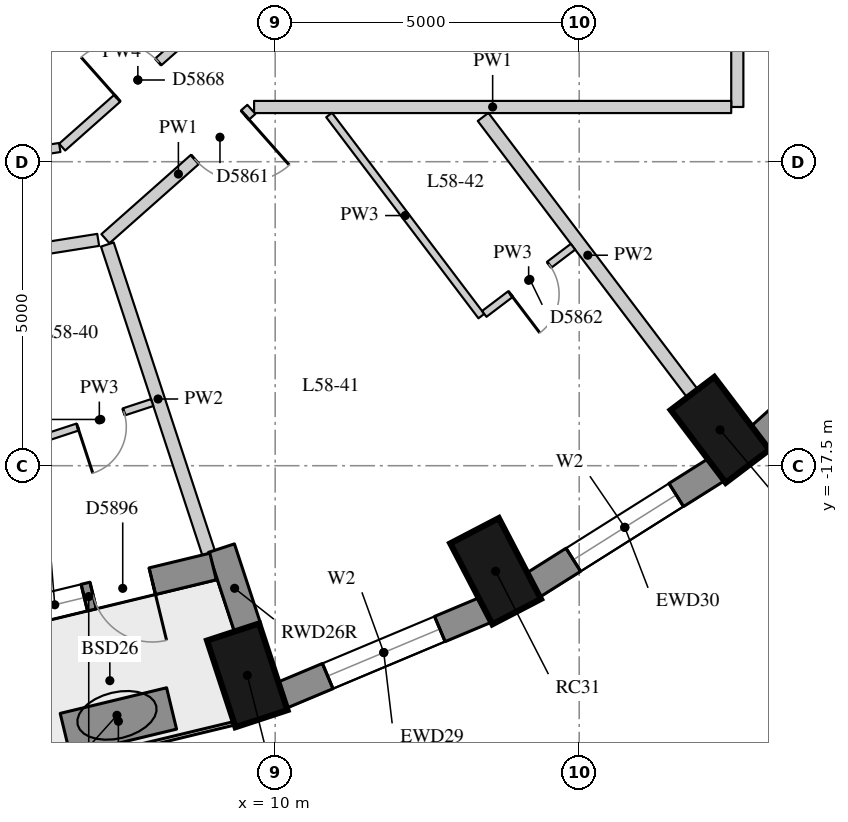
"""IFC4 building model, lengths in metres.
Left out: names, types, materials, properties, quantities, classifications, styles, units other than length and angle.
Written with IfcOpenShell. Run it as: python <this file> out.ifc"""

import sys

from ifc_helpers import new_model, si_unit, direction, frame, frame_2d, origin, origin_2d, place, context, subcontext, project, spatial, rectangle, extrude, element, fill, save


model = new_model("IFC4")
c1 = context("Model", 3, precision=1e-05, world=origin(), true_north=direction((0.0, 1.0)))
c2 = subcontext(c1, "Body", "Model", "MODEL_VIEW")
j1 = project(units=[si_unit("LENGTHUNIT", "METRE"), si_unit("PLANEANGLEUNIT", "RADIAN")], contexts=[c1])
p1 = place(None, origin())
s1 = spatial("IfcSite", under=j1, at=p1, CompositionType="ELEMENT")
p2 = place(p1, origin())
s2 = spatial("IfcBuilding", under=s1, at=p2, CompositionType="ELEMENT")
p3 = place(p2, frame((0.0, 0.0, 205.7)))
s3 = spatial("IfcBuildingStorey", under=s2, at=p3, CompositionType="ELEMENT", Elevation=205.7)
for number, where, z_axis, x_axis in (
    (1, (9.541, -20.948, 0.0), (0.0, 0.0, 1.0), (0.312, -0.95, 0.0)),
    (2, (13.625, -19.235, 0.0), (0.0, 0.0, 1.0), (0.462, -0.887, 0.0)),
    (3, (17.316, -16.911, 0.0), (0.0, 0.0, 1.0), (0.604, -0.797, 0.0)),
):
    element("IfcColumn", number, at=place(p3, frame(where, z_axis=z_axis, x_axis=x_axis)), inside=s3, PredefinedType="COLUMN", context=c2, shape_type="SweptSolid", body=[
        extrude(rectangle(XDim=1.5, YDim=0.9, at=origin_2d()), origin(), (0.0, 0.0, 1.0), 3.3),
    ])
p4 = place(p3, frame((10.103, -21.279, 0.0), z_axis=(0.0, 0.0, 1.0), x_axis=(0.922168222612, 0.386789050006, 0.0)))
e4 = element("IfcWall", 4, at=p4, inside=s3, PredefinedType="SOLIDWALL", context=c2, shape_type="SweptSolid", body=[
    extrude(rectangle(XDim=3.651, YDim=0.45, at=frame_2d((1.825, 0.0))), origin(), (0.0, 0.0, 1.0), 3.02),
])
p5 = place(p4, frame((0.825, 0.0, 0.4)))
e5 = element("IfcOpeningElement", 5, at=p5, cuts=e4, PredefinedType="OPENING", context=c2, shape_type="SweptSolid", body=[
    extrude(rectangle(XDim=2.0, YDim=1.75, at=frame_2d((1.0, 0.875))), frame((0.0, 0.235, 0.0), z_axis=(0.0, -1.0, 0.0), x_axis=(1.0, 0.0, 0.0)), (0.0, 0.0, 1.0), 0.47),
])
p6 = place(p3, frame((14.232, -19.47, 0.0), z_axis=(0.0, 0.0, 1.0), x_axis=(0.84614984472, 0.532945063098, 0.0)))
e6 = element("IfcWall", 6, at=p6, inside=s3, PredefinedType="SOLIDWALL", context=c2, shape_type="SweptSolid", body=[
    extrude(rectangle(XDim=3.586, YDim=0.45, at=frame_2d((1.793, 0.0))), origin(), (0.0, 0.0, 1.0), 3.02),
])
p7 = place(p6, frame((0.793, 0.0, 0.4)))
e7 = element("IfcOpeningElement", 7, at=p7, cuts=e6, PredefinedType="OPENING", context=c2, shape_type="SweptSolid", body=[
    extrude(rectangle(XDim=2.0, YDim=1.75, at=frame_2d((1.0, 0.875))), frame((0.0, 0.235, 0.0), z_axis=(0.0, -1.0, 0.0), x_axis=(1.0, 0.0, 0.0)), (0.0, 0.0, 1.0), 0.47),
])
p8 = place(p3, frame((17.953, -17.04, 0.0), z_axis=(0.0, 0.0, 1.0), x_axis=(0.743442727602, 0.668799604348, 0.0)))
e8 = element("IfcWall", 8, at=p8, inside=s3, PredefinedType="SOLIDWALL", context=c2, shape_type="SweptSolid", body=[
    extrude(rectangle(XDim=3.513, YDim=0.45, at=frame_2d((1.756, 0.0))), origin(), (0.0, 0.0, 1.0), 3.02),
])
p9 = place(p3, frame((9.55, -20.177, 0.0), z_axis=(0.0, 0.0, 1.0), x_axis=(-0.31201065878, 0.950078601384, 0.0)))
e9 = element("IfcWall", 9, at=p9, inside=s3, PredefinedType="SOLIDWALL", context=c2, shape_type="SweptSolid", body=[
    extrude(rectangle(XDim=1.39, YDim=0.45, at=frame_2d((0.695, 0.0))), origin(), (0.0, 0.0, 1.0), 3.02),
])
p10 = place(p3, frame((4.889, -20.146, 0.0), z_axis=(0.0, 0.0, 1.0), x_axis=(0.972004107579, 0.234963858602, 0.0)))
e10 = element("IfcWall", 10, at=p10, inside=s3, PredefinedType="SOLIDWALL", context=c2, shape_type="SweptSolid", body=[
    extrude(rectangle(XDim=4.207, YDim=0.45, at=frame_2d((2.104, 0.0))), origin(), (0.0, 0.0, 1.0), 3.02),
])
p11 = place(p10, frame((1.029, 0.0, 0.4)))
e11 = element("IfcOpeningElement", 11, at=p11, cuts=e10, PredefinedType="OPENING", context=c2, shape_type="SweptSolid", body=[
    extrude(rectangle(XDim=1.0, YDim=1.75, at=frame_2d((0.5, 0.875))), frame((0.0, 0.235, 0.0), z_axis=(0.0, -1.0, 0.0), x_axis=(1.0, 0.0, 0.0)), (0.0, 0.0, 1.0), 0.47),
])
p12 = place(p10, frame((2.179, 0.0, 0.0)))
e12 = element("IfcOpeningElement", 12, at=p12, cuts=e10, PredefinedType="OPENING", context=c2, shape_type="SweptSolid", body=[
    extrude(rectangle(XDim=1.0, YDim=2.15, at=frame_2d((0.5, 1.075))), frame((0.0, 0.235, 0.0), z_axis=(0.0, -1.0, 0.0), x_axis=(1.0, 0.0, 0.0)), (0.0, 0.0, 1.0), 0.47),
])
p13 = place(p3, frame((6.546, -21.914, 0.0), z_axis=(0.0, 0.0, 1.0), x_axis=(0.97215043642, 0.234357694494, 0.0)))
e13 = element("IfcWall", 13, at=p13, inside=s3, PredefinedType="USERDEFINED", context=c2, shape_type="SweptSolid", body=[
    extrude(rectangle(XDim=1.8, YDim=0.7, at=frame_2d((0.9, 0.0))), origin(), (0.0, 0.0, 1.0), 0.75),
])
p14 = place(p3, frame((17.6, -4.617, 0.0), z_axis=(0.0, 0.0, 1.0), x_axis=(0.0, -1.0, 0.0)))
e14 = element("IfcWall", 14, at=p14, inside=s3, PredefinedType="PARTITIONING", context=c2, shape_type="SweptSolid", body=[
    extrude(rectangle(XDim=6.983, YDim=0.2, at=frame_2d((3.492, 0.0))), origin(), (0.0, 0.0, 1.0), 3.02),
])
p15 = place(p14, frame((2.592, 0.0, 0.0)))
e15 = element("IfcOpeningElement", 15, at=p15, cuts=e14, PredefinedType="OPENING", context=c2, shape_type="SweptSolid", body=[
    extrude(rectangle(XDim=1.8, YDim=2.1, at=frame_2d((0.9, 1.05))), frame((0.0, 0.11, 0.0), z_axis=(0.0, -1.0, 0.0), x_axis=(1.0, 0.0, 0.0)), (0.0, 0.0, 1.0), 0.22),
])
p16 = place(p3, frame((17.5, -11.6, 0.0), z_axis=(0.0, 0.0, 1.0), x_axis=(-1.0, 0.0, 0.0)))
e16 = element("IfcWall", 16, at=p16, inside=s3, PredefinedType="PARTITIONING", context=c2, shape_type="SweptSolid", body=[
    extrude(rectangle(XDim=7.847, YDim=0.2, at=frame_2d((3.923, 0.0))), origin(), (0.0, 0.0, 1.0), 3.02),
])
p17 = place(p3, frame((9.608, -11.64, 0.0), z_axis=(0.0, 0.0, 1.0), x_axis=(-0.748412200225, -0.663233879227, 0.0)))
e17 = element("IfcWall", 17, at=p17, inside=s3, PredefinedType="PARTITIONING", context=c2, shape_type="SweptSolid", body=[
    extrude(rectangle(XDim=3.207, YDim=0.2, at=frame_2d((1.604, 0.0))), origin(), (0.0, 0.0, 1.0), 3.02),
])
p18 = place(p17, frame((0.14, 0.0, 0.0)))
e18 = element("IfcOpeningElement", 18, at=p18, cuts=e17, PredefinedType="OPENING", context=c2, shape_type="SweptSolid", body=[
    extrude(rectangle(XDim=1.1, YDim=2.1, at=frame_2d((0.55, 1.05))), frame((0.0, 0.11, 0.0), z_axis=(0.0, -1.0, 0.0), x_axis=(1.0, 0.0, 0.0)), (0.0, 0.0, 1.0), 0.22),
])
p19 = place(p3, frame((7.089, -13.786, 0.0), z_axis=(0.0, 0.0, 1.0), x_axis=(-0.987636270411, -0.156762869867, 0.0)))
e19 = element("IfcWall", 19, at=p19, inside=s3, PredefinedType="PARTITIONING", context=c2, shape_type="SweptSolid", body=[
    extrude(rectangle(XDim=6.469, YDim=0.2, at=frame_2d((3.235, 0.0))), origin(), (0.0, 0.0, 1.0), 2.42),
])
p20 = place(p19, frame((5.016, 0.0, 0.0)))
e20 = element("IfcOpeningElement", 20, at=p20, cuts=e19, PredefinedType="OPENING", context=c2, shape_type="SweptSolid", body=[
    extrude(rectangle(XDim=1.1, YDim=2.1, at=frame_2d((0.55, 1.05))), frame((0.0, 0.11, 0.0), z_axis=(0.0, -1.0, 0.0), x_axis=(1.0, 0.0, 0.0)), (0.0, 0.0, 1.0), 0.22),
])
p21 = place(p3, frame((8.987, -10.052, 0.0), z_axis=(0.0, 0.0, 1.0), x_axis=(-0.74833949077, -0.66331591761, 0.0)))
e21 = element("IfcWall", 21, at=p21, inside=s3, PredefinedType="PARTITIONING", context=c2, shape_type="SweptSolid", body=[
    extrude(rectangle(XDim=3.328, YDim=0.15, at=frame_2d((1.664, 0.0))), origin(), (0.0, 0.0, 1.0), 3.02),
])
p22 = place(p21, frame((1.214, 0.0, 0.0)))
e22 = element("IfcOpeningElement", 22, at=p22, cuts=e21, PredefinedType="OPENING", context=c2, shape_type="SweptSolid", body=[
    extrude(rectangle(XDim=0.9, YDim=2.1, at=frame_2d((0.45, 1.05))), frame((0.0, 0.085, 0.0), z_axis=(0.0, -1.0, 0.0), x_axis=(1.0, 0.0, 0.0)), (0.0, 0.0, 1.0), 0.17),
])
p23 = place(p3, frame((6.457, -12.266, 0.0), z_axis=(0.0, 0.0, 1.0), x_axis=(-0.987639766053, -0.156740845063, 0.0)))
e23 = element("IfcWall", 23, at=p23, inside=s3, PredefinedType="PARTITIONING", context=c2, shape_type="SweptSolid", body=[
    extrude(rectangle(XDim=2.69, YDim=0.15, at=frame_2d((1.345, 0.0))), origin(), (0.0, 0.0, 1.0), 3.02),
])
p24 = place(p3, frame((8.908, -18.944, 0.0), z_axis=(0.0, 0.0, 1.0), x_axis=(-0.311910788491, 0.950111393481, 0.0)))
e24 = element("IfcWall", 24, at=p24, inside=s3, PredefinedType="PARTITIONING", context=c2, shape_type="SweptSolid", body=[
    extrude(rectangle(XDim=5.348, YDim=0.22, at=frame_2d((2.674, 0.0))), origin(), (0.0, 0.0, 1.0), 3.02),
])
p25 = place(p3, frame((16.863, -16.312, 0.0), z_axis=(0.0, 0.0, 1.0), x_axis=(-0.603636051313, 0.797260006243, 0.0)))
e25 = element("IfcWall", 25, at=p25, inside=s3, PredefinedType="PARTITIONING", context=c2, shape_type="SweptSolid", body=[
    extrude(rectangle(XDim=5.706, YDim=0.22, at=frame_2d((2.853, 0.0))), origin(), (0.0, 0.0, 1.0), 3.02),
])
p26 = place(p3, frame((10.887, -11.732, 0.0), z_axis=(0.0, 0.0, 1.0), x_axis=(0.603646932038, -0.797251767913, 0.0)))
e26 = element("IfcWall", 26, at=p26, inside=s3, PredefinedType="PARTITIONING", context=c2, shape_type="SweptSolid", body=[
    extrude(rectangle(XDim=4.149, YDim=0.12, at=frame_2d((2.074, 0.0))), origin(), (0.0, 0.0, 1.0), 3.02),
])
p27 = place(p3, frame((6.239, -17.032, 0.0), z_axis=(0.0, 0.0, 1.0), x_axis=(0.950127811882, 0.311860771962, 0.0)))
e27 = element("IfcWall", 27, at=p27, inside=s3, PredefinedType="PARTITIONING", context=c2, shape_type="SweptSolid", body=[
    extrude(rectangle(XDim=1.83, YDim=0.12, at=frame_2d((0.915, 0.0))), origin(), (0.0, 0.0, 1.0), 3.02),
])
p28 = place(p27, frame((0.54, 0.0, 0.0)))
e28 = element("IfcOpeningElement", 28, at=p28, cuts=e27, PredefinedType="OPENING", context=c2, shape_type="SweptSolid", body=[
    extrude(rectangle(XDim=0.8, YDim=2.1, at=frame_2d((0.4, 1.05))), frame((0.0, 0.07, 0.0), z_axis=(0.0, -1.0, 0.0), x_axis=(1.0, 0.0, 0.0)), (0.0, 0.0, 1.0), 0.14),
])
p29 = place(p3, frame((13.439, -15.003, 0.0), z_axis=(0.0, 0.0, 1.0), x_axis=(0.797238062708, 0.603665032422, 0.0)))
e29 = element("IfcWall", 29, at=p29, inside=s3, PredefinedType="PARTITIONING", context=c2, shape_type="SweptSolid", body=[
    extrude(rectangle(XDim=1.83, YDim=0.12, at=frame_2d((0.915, 0.0))), origin(), (0.0, 0.0, 1.0), 3.02),
])
p30 = place(p29, frame((0.54, 0.0, 0.0)))
e30 = element("IfcOpeningElement", 30, at=p30, cuts=e29, PredefinedType="OPENING", context=c2, shape_type="SweptSolid", body=[
    extrude(rectangle(XDim=0.8, YDim=2.1, at=frame_2d((0.4, 1.05))), frame((0.0, 0.07, 0.0), z_axis=(0.0, -1.0, 0.0), x_axis=(1.0, 0.0, 0.0)), (0.0, 0.0, 1.0), 0.14),
])
p31 = place(p5, origin())
e31 = element("IfcWindow", 31, at=p31, inside=s3, PartitioningType="SINGLE_PANEL", PredefinedType="WINDOW", context=c2, shape_type="SweptSolid", body=[
    extrude(rectangle(XDim=2.0, YDim=1.75, at=frame_2d((1.0, 0.875))), frame((0.0, 0.035, 0.0), z_axis=(0.0, -1.0, 0.0), x_axis=(1.0, 0.0, 0.0)), (0.0, 0.0, 1.0), 0.06),
])
fill(e5, e31)
p32 = place(p7, origin())
e32 = element("IfcWindow", 32, at=p32, inside=s3, PartitioningType="SINGLE_PANEL", PredefinedType="WINDOW", context=c2, shape_type="SweptSolid", body=[
    extrude(rectangle(XDim=2.0, YDim=1.75, at=frame_2d((1.0, 0.875))), frame((0.0, 0.035, 0.0), z_axis=(0.0, -1.0, 0.0), x_axis=(1.0, 0.0, 0.0)), (0.0, 0.0, 1.0), 0.06),
])
fill(e7, e32)
p33 = place(p11, origin())
e33 = element("IfcWindow", 33, at=p33, inside=s3, PartitioningType="SINGLE_PANEL", PredefinedType="WINDOW", context=c2, shape_type="SweptSolid", body=[
    extrude(rectangle(XDim=1.0, YDim=1.75, at=frame_2d((0.5, 0.875))), frame((0.0, 0.035, 0.0), z_axis=(0.0, -1.0, 0.0), x_axis=(1.0, 0.0, 0.0)), (0.0, 0.0, 1.0), 0.06),
])
fill(e11, e33)
p34 = place(p12, frame((1.0, 0.0, 0.0), z_axis=(0.0, 0.0, 1.0), x_axis=(-1.0, 0.0, 0.0)))
e34 = element("IfcDoor", 34, at=p34, inside=s3, OperationType="SINGLE_SWING_LEFT", PredefinedType="DOOR", context=c2, shape_type="SweptSolid", body=[
    extrude(rectangle(XDim=1.0, YDim=2.15, at=frame_2d((0.5, 1.075))), frame((0.0, 0.075, 0.0), z_axis=(0.0, -1.0, 0.0), x_axis=(1.0, 0.0, 0.0)), (0.0, 0.0, 1.0), 0.05),
])
fill(e12, e34)
p35 = place(p28, origin())
e35 = element("IfcDoor", 35, at=p35, inside=s3, OperationType="SINGLE_SWING_RIGHT", PredefinedType="DOOR", context=c2, shape_type="SweptSolid", body=[
    extrude(rectangle(XDim=0.8, YDim=2.1, at=frame_2d((0.4, 1.05))), frame((0.0, 0.025, 0.0), z_axis=(0.0, -1.0, 0.0), x_axis=(1.0, 0.0, 0.0)), (0.0, 0.0, 1.0), 0.05),
])
fill(e28, e35)
p36 = place(p18, origin())
e36 = element("IfcDoor", 36, at=p36, inside=s3, OperationType="SINGLE_SWING_LEFT", PredefinedType="DOOR", context=c2, shape_type="SweptSolid", body=[
    extrude(rectangle(XDim=1.1, YDim=2.1, at=frame_2d((0.55, 1.05))), frame((0.0, 0.025, 0.0), z_axis=(0.0, -1.0, 0.0), x_axis=(1.0, 0.0, 0.0)), (0.0, 0.0, 1.0), 0.05),
])
fill(e18, e36)
p37 = place(p30, origin())
e37 = element("IfcDoor", 37, at=p37, inside=s3, OperationType="SINGLE_SWING_RIGHT", PredefinedType="DOOR", context=c2, shape_type="SweptSolid", body=[
    extrude(rectangle(XDim=0.8, YDim=2.1, at=frame_2d((0.4, 1.05))), frame((0.0, 0.025, 0.0), z_axis=(0.0, -1.0, 0.0), x_axis=(1.0, 0.0, 0.0)), (0.0, 0.0, 1.0), 0.05),
])
fill(e30, e37)
p38 = place(p22, origin())
e38 = element("IfcDoor", 38, at=p38, inside=s3, OperationType="SINGLE_SWING_LEFT", PredefinedType="DOOR", context=c2, shape_type="SweptSolid", body=[
    extrude(rectangle(XDim=0.9, YDim=2.1, at=frame_2d((0.45, 1.05))), frame((0.0, 0.025, 0.0), z_axis=(0.0, -1.0, 0.0), x_axis=(1.0, 0.0, 0.0)), (0.0, 0.0, 1.0), 0.05),
])
fill(e22, e38)
save(model, sys.argv[1])
